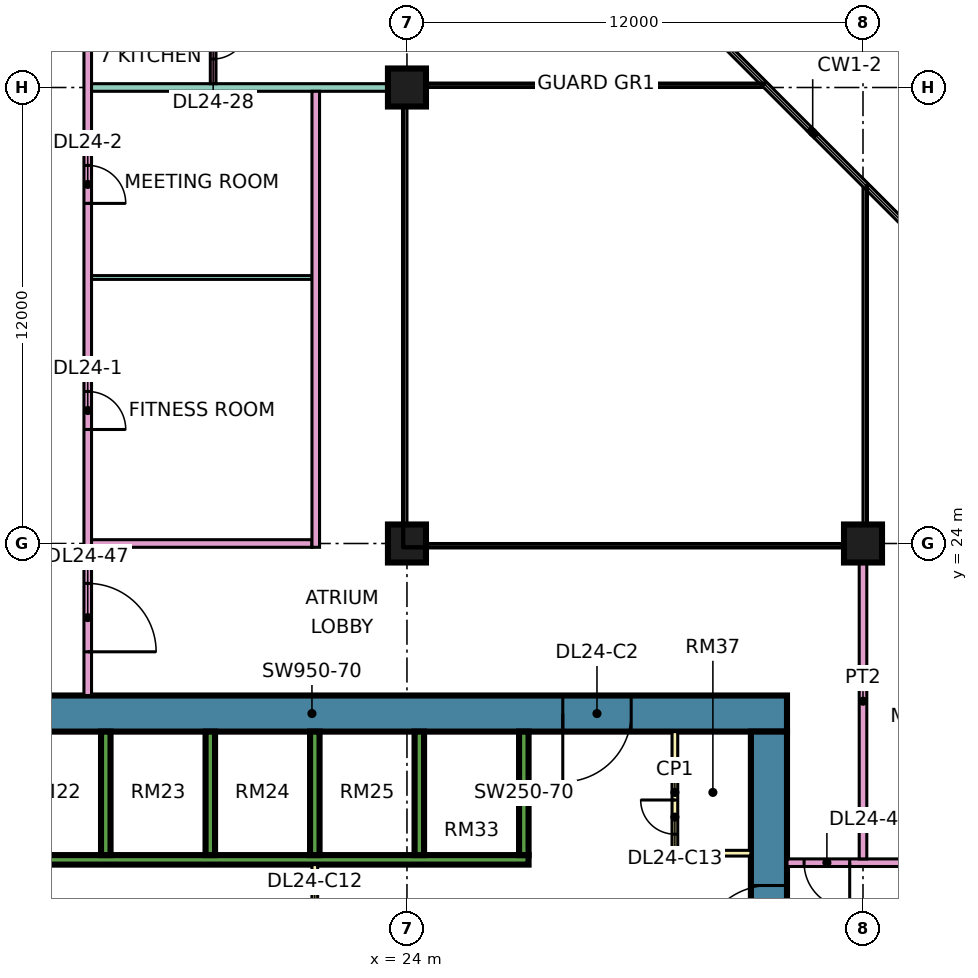
"""IFC4 building model, lengths in metres.
Left out: names, types, materials, properties, quantities, classifications, styles, units other than length and angle.
Written with IfcOpenShell. Run it as: python <this file> out.ifc"""

import sys

from ifc_helpers import new_model, si_unit, direction, frame, frame_2d, origin, origin_2d, place, context, subcontext, project, spatial, rectangle, extrude, element, fill, save


model = new_model("IFC4")
c1 = context("Model", 3, precision=1e-05, world=origin(), true_north=direction((0.0, 1.0)))
c2 = subcontext(c1, "Body", "Model", "MODEL_VIEW")
j1 = project(units=[si_unit("LENGTHUNIT", "METRE"), si_unit("PLANEANGLEUNIT", "RADIAN")], contexts=[c1])
p1 = place(None, origin())
s1 = spatial("IfcSite", under=j1, at=p1, CompositionType="ELEMENT")
p2 = place(p1, origin())
s2 = spatial("IfcBuilding", under=s1, at=p2, CompositionType="ELEMENT")
p3 = place(p2, frame((0.0, 0.0, 106.9)))
s3 = spatial("IfcBuildingStorey", under=s2, at=p3, CompositionType="ELEMENT", Elevation=106.9)
for number, where, z_axis, x_axis in (
    (1, (24.0, 24.0, 0.0), (0.0, 0.0, 1.0), (1.0, 0.0, 0.0)),
    (2, (24.0, 36.0, 0.0), (0.0, 0.0, 1.0), (1.0, 0.0, 0.0)),
    (3, (36.0, 24.0, 0.0), (0.0, 0.0, 1.0), (1.0, 0.0, 0.0)),
):
    element("IfcColumn", number, at=place(p3, frame(where, z_axis=z_axis, x_axis=x_axis)), inside=s3, PredefinedType="COLUMN", context=c2, shape_type="SweptSolid", body=[
        extrude(rectangle(XDim=1.0, YDim=1.0, at=origin_2d()), origin(), (0.0, 0.0, 1.0), 3.75),
    ])
p4 = place(p3, frame((9.0, 19.525, 0.0), z_axis=(0.0, 0.0, 1.0), x_axis=(1.0, 0.0, 0.0)))
e4 = element("IfcWall", 4, at=p4, inside=s3, PredefinedType="SHEAR", context=c2, shape_type="SweptSolid", body=[
    extrude(rectangle(XDim=25.0, YDim=0.95, at=frame_2d((12.5, 0.0))), origin(), (0.0, 0.0, 1.0), 3.75),
])
p5 = place(p4, frame((19.1, 0.0, 0.0)))
e5 = element("IfcOpeningElement", 5, at=p5, cuts=e4, PredefinedType="OPENING", context=c2, shape_type="SweptSolid", body=[
    extrude(rectangle(XDim=1.8, YDim=2.4, at=frame_2d((0.9, 1.2))), frame((0.0, 0.485, 0.0), z_axis=(0.0, -1.0, 0.0), x_axis=(1.0, 0.0, 0.0)), (0.0, 0.0, 1.0), 0.97),
])
p6 = place(p3, frame((33.525, 7.95, 0.0), z_axis=(0.0, 0.0, 1.0), x_axis=(0.0, 1.0, 0.0)))
e6 = element("IfcWall", 6, at=p6, inside=s3, PredefinedType="SHEAR", context=c2, shape_type="SweptSolid", body=[
    extrude(rectangle(XDim=11.1, YDim=0.95, at=frame_2d((5.55, 0.0))), origin(), (0.0, 0.0, 1.0), 3.75),
])
p7 = place(p6, frame((5.25, 0.0, 0.0)))
e7 = element("IfcOpeningElement", 7, at=p7, cuts=e6, PredefinedType="OPENING", context=c2, shape_type="SweptSolid", body=[
    extrude(rectangle(XDim=1.8, YDim=2.4, at=frame_2d((0.9, 1.2))), frame((0.0, 0.485, 0.0), z_axis=(0.0, -1.0, 0.0), x_axis=(1.0, 0.0, 0.0)), (0.0, 0.0, 1.0), 0.97),
])
p8 = place(p3, frame((13.45, 15.675, 0.0), z_axis=(0.0, 0.0, 1.0), x_axis=(1.0, 0.0, 0.0)))
e8 = element("IfcWall", 8, at=p8, inside=s3, PredefinedType="SHEAR", context=c2, shape_type="SweptSolid", body=[
    extrude(rectangle(XDim=13.75, YDim=0.25, at=frame_2d((6.875, 0.0))), origin(), (0.0, 0.0, 1.0), 3.75),
])
for number, where, z_axis, x_axis in (
    (9, (16.075, 15.8, 0.0), (0.0, 0.0, 1.0), (0.0, 1.0, 0.0)),
    (10, (18.825, 15.8, 0.0), (0.0, 0.0, 1.0), (0.0, 1.0, 0.0)),
    (11, (21.575, 15.8, 0.0), (0.0, 0.0, 1.0), (0.0, 1.0, 0.0)),
    (12, (24.325, 15.8, 0.0), (0.0, 0.0, 1.0), (0.0, 1.0, 0.0)),
    (13, (27.075, 15.8, 0.0), (0.0, 0.0, 1.0), (0.0, 1.0, 0.0)),
):
    element("IfcWall", number, at=place(p3, frame(where, z_axis=z_axis, x_axis=x_axis)), inside=s3, PredefinedType="SHEAR", context=c2, shape_type="SweptSolid", body=[
        extrude(rectangle(XDim=3.25, YDim=0.25, at=frame_2d((1.625, 0.0))), origin(), (0.0, 0.0, 1.0), 3.75),
    ])
p9 = place(p3, frame((21.575, 11.45, 0.0), z_axis=(0.0, 0.0, 1.0), x_axis=(0.0, 1.0, 0.0)))
e14 = element("IfcWall", 14, at=p9, inside=s3, PredefinedType="PARTITIONING", context=c2, shape_type="SweptSolid", body=[
    extrude(rectangle(XDim=4.1, YDim=0.15, at=frame_2d((2.05, 0.0))), origin(), (0.0, 0.0, 1.0), 3.35),
])
p10 = place(p9, frame((1.15, 0.0, 0.0)))
e15 = element("IfcOpeningElement", 15, at=p10, cuts=e14, PredefinedType="OPENING", context=c2, shape_type="SweptSolid", body=[
    extrude(rectangle(XDim=1.8, YDim=2.4, at=frame_2d((0.9, 1.2))), frame((0.0, 0.085, 0.0), z_axis=(0.0, -1.0, 0.0), x_axis=(1.0, 0.0, 0.0)), (0.0, 0.0, 1.0), 0.17),
])
p11 = place(p3, frame((31.05, 15.85, 0.0), z_axis=(0.0, 0.0, 1.0), x_axis=(0.0, 1.0, 0.0)))
e16 = element("IfcWall", 16, at=p11, inside=s3, PredefinedType="PARTITIONING", context=c2, shape_type="SweptSolid", body=[
    extrude(rectangle(XDim=3.2, YDim=0.15, at=frame_2d((1.6, 0.0))), origin(), (0.0, 0.0, 1.0), 3.35),
])
p12 = place(p11, frame((0.5, 0.0, 0.0)))
e17 = element("IfcOpeningElement", 17, at=p12, cuts=e16, PredefinedType="OPENING", context=c2, shape_type="SweptSolid", body=[
    extrude(rectangle(XDim=0.9, YDim=2.1, at=frame_2d((0.45, 1.05))), frame((0.0, 0.085, 0.0), z_axis=(0.0, -1.0, 0.0), x_axis=(1.0, 0.0, 0.0)), (0.0, 0.0, 1.0), 0.17),
])
p13 = place(p3, frame((31.05, 15.85, 0.0), z_axis=(0.0, 0.0, 1.0), x_axis=(1.0, 0.0, 0.0)))
e18 = element("IfcWall", 18, at=p13, inside=s3, PredefinedType="PARTITIONING", context=c2, shape_type="SweptSolid", body=[
    extrude(rectangle(XDim=2.0, YDim=0.15, at=frame_2d((1.0, 0.0))), origin(), (0.0, 0.0, 1.0), 3.35),
])
p14 = place(p3, frame((15.6, 20.0, 0.0), z_axis=(0.0, 0.0, 1.0), x_axis=(0.0, 1.0, 0.0)))
e19 = element("IfcWall", 19, at=p14, inside=s3, PredefinedType="PARTITIONING", context=c2, shape_type="SweptSolid", body=[
    extrude(rectangle(XDim=27.775, YDim=0.2, at=frame_2d((13.887, 0.0))), origin(), (0.0, 0.0, 1.0), 3.35),
])
p15 = place(p14, frame((7.0, 0.0, 0.0)))
e20 = element("IfcOpeningElement", 20, at=p15, cuts=e19, PredefinedType="OPENING", context=c2, shape_type="SweptSolid", body=[
    extrude(rectangle(XDim=1.0, YDim=2.1, at=frame_2d((0.5, 1.05))), frame((0.0, 0.11, 0.0), z_axis=(0.0, -1.0, 0.0), x_axis=(1.0, 0.0, 0.0)), (0.0, 0.0, 1.0), 0.22),
])
p16 = place(p14, frame((12.95, 0.0, 0.0)))
e21 = element("IfcOpeningElement", 21, at=p16, cuts=e19, PredefinedType="OPENING", context=c2, shape_type="SweptSolid", body=[
    extrude(rectangle(XDim=1.0, YDim=2.1, at=frame_2d((0.5, 1.05))), frame((0.0, 0.11, 0.0), z_axis=(0.0, -1.0, 0.0), x_axis=(1.0, 0.0, 0.0)), (0.0, 0.0, 1.0), 0.22),
])
p17 = place(p14, frame((23.2, 0.0, 0.0)))
e22 = element("IfcOpeningElement", 22, at=p17, cuts=e19, PredefinedType="OPENING", context=c2, shape_type="SweptSolid", body=[
    extrude(rectangle(XDim=1.0, YDim=2.1, at=frame_2d((0.5, 1.05))), frame((0.0, 0.11, 0.0), z_axis=(0.0, -1.0, 0.0), x_axis=(1.0, 0.0, 0.0)), (0.0, 0.0, 1.0), 0.22),
])
p18 = place(p14, frame((1.15, 0.0, 0.0)))
e23 = element("IfcOpeningElement", 23, at=p18, cuts=e19, PredefinedType="OPENING", context=c2, shape_type="SweptSolid", body=[
    extrude(rectangle(XDim=1.8, YDim=2.1, at=frame_2d((0.9, 1.05))), frame((0.0, 0.11, 0.0), z_axis=(0.0, -1.0, 0.0), x_axis=(1.0, 0.0, 0.0)), (0.0, 0.0, 1.0), 0.22),
])
p19 = place(p14, frame((25.9, 0.0, 0.0)))
e24 = element("IfcOpeningElement", 24, at=p19, cuts=e19, PredefinedType="OPENING", context=c2, shape_type="SweptSolid", body=[
    extrude(rectangle(XDim=1.0, YDim=2.1, at=frame_2d((0.5, 1.05))), frame((0.0, 0.11, 0.0), z_axis=(0.0, -1.0, 0.0), x_axis=(1.0, 0.0, 0.0)), (0.0, 0.0, 1.0), 0.22),
])
p20 = place(p3, frame((15.7, 24.0, 0.0), z_axis=(0.0, 0.0, 1.0), x_axis=(1.0, 0.0, 0.0)))
e25 = element("IfcWall", 25, at=p20, inside=s3, PredefinedType="PARTITIONING", context=c2, shape_type="SweptSolid", body=[
    extrude(rectangle(XDim=5.8, YDim=0.2, at=frame_2d((2.9, 0.0))), origin(), (0.0, 0.0, 1.0), 3.35),
])
p21 = place(p3, frame((15.7, 31.0, 0.0), z_axis=(0.0, 0.0, 1.0), x_axis=(1.0, 0.0, 0.0)))
e26 = element("IfcWall", 26, at=p21, inside=s3, PredefinedType="PARTITIONING", context=c2, shape_type="SweptSolid", body=[
    extrude(rectangle(XDim=5.8, YDim=0.1, at=frame_2d((2.9, 0.0))), origin(), (0.0, 0.0, 1.0), 3.35),
])
p22 = place(p3, frame((15.7, 36.0, 0.0), z_axis=(0.0, 0.0, 1.0), x_axis=(1.0, 0.0, 0.0)))
e27 = element("IfcWall", 27, at=p22, inside=s3, PredefinedType="PARTITIONING", context=c2, shape_type="SweptSolid", body=[
    extrude(rectangle(XDim=8.3, YDim=0.2, at=frame_2d((4.15, 0.0))), origin(), (0.0, 0.0, 1.0), 3.35),
])
p23 = place(p3, frame((18.9, 36.1, 0.0), z_axis=(0.0, 0.0, 1.0), x_axis=(0.0, 1.0, 0.0)))
e28 = element("IfcWall", 28, at=p23, inside=s3, PredefinedType="PARTITIONING", context=c2, shape_type="SweptSolid", body=[
    extrude(rectangle(XDim=6.275, YDim=0.15, at=frame_2d((3.137, 0.0))), origin(), (0.0, 0.0, 1.0), 3.35),
])
p24 = place(p23, frame((0.65, 0.0, 0.0)))
e29 = element("IfcOpeningElement", 29, at=p24, cuts=e28, PredefinedType="OPENING", context=c2, shape_type="SweptSolid", body=[
    extrude(rectangle(XDim=0.9, YDim=2.1, at=frame_2d((0.45, 1.05))), frame((0.0, 0.085, 0.0), z_axis=(0.0, -1.0, 0.0), x_axis=(1.0, 0.0, 0.0)), (0.0, 0.0, 1.0), 0.17),
])
p25 = place(p3, frame((21.6, 23.9, 0.0), z_axis=(0.0, 0.0, 1.0), x_axis=(0.0, 1.0, 0.0)))
e30 = element("IfcWall", 30, at=p25, inside=s3, PredefinedType="PARTITIONING", context=c2, shape_type="SweptSolid", body=[
    extrude(rectangle(XDim=12.0, YDim=0.2, at=frame_2d((6.0, 0.0))), origin(), (0.0, 0.0, 1.0), 3.35),
])
p26 = place(p3, frame((34.0, 15.6, 0.0), z_axis=(0.0, 0.0, 1.0), x_axis=(1.0, 0.0, 0.0)))
e31 = element("IfcWall", 31, at=p26, inside=s3, PredefinedType="PARTITIONING", context=c2, shape_type="SweptSolid", body=[
    extrude(rectangle(XDim=10.35, YDim=0.2, at=frame_2d((5.175, 0.0))), origin(), (0.0, 0.0, 1.0), 3.35),
])
p27 = place(p26, frame((5.6, 0.0, 0.0)))
e32 = element("IfcOpeningElement", 32, at=p27, cuts=e31, PredefinedType="OPENING", context=c2, shape_type="SweptSolid", body=[
    extrude(rectangle(XDim=1.0, YDim=2.1, at=frame_2d((0.5, 1.05))), frame((0.0, 0.11, 0.0), z_axis=(0.0, -1.0, 0.0), x_axis=(1.0, 0.0, 0.0)), (0.0, 0.0, 1.0), 0.22),
])
p28 = place(p26, frame((0.45, 0.0, 0.0)))
e33 = element("IfcOpeningElement", 33, at=p28, cuts=e31, PredefinedType="OPENING", context=c2, shape_type="SweptSolid", body=[
    extrude(rectangle(XDim=1.2, YDim=2.1, at=frame_2d((0.6, 1.05))), frame((0.0, 0.11, 0.0), z_axis=(0.0, -1.0, 0.0), x_axis=(1.0, 0.0, 0.0)), (0.0, 0.0, 1.0), 0.22),
])
p29 = place(p3, frame((36.0, 15.7, 0.0), z_axis=(0.0, 0.0, 1.0), x_axis=(0.0, 1.0, 0.0)))
e34 = element("IfcWall", 34, at=p29, inside=s3, PredefinedType="PARTITIONING", context=c2, shape_type="SweptSolid", body=[
    extrude(rectangle(XDim=8.3, YDim=0.2, at=frame_2d((4.15, 0.0))), origin(), (0.0, 0.0, 1.0), 3.35),
])
p30 = place(p7, origin())
e35 = element("IfcDoor", 35, at=p30, inside=s3, OperationType="DOUBLE_DOOR_SINGLE_SWING", PredefinedType="DOOR", context=c2, shape_type="SweptSolid", body=[
    extrude(rectangle(XDim=1.8, YDim=2.4, at=frame_2d((0.9, 1.2))), frame((0.0, 0.025, 0.0), z_axis=(0.0, -1.0, 0.0), x_axis=(1.0, 0.0, 0.0)), (0.0, 0.0, 1.0), 0.05),
])
fill(e7, e35)
p31 = place(p5, frame((1.8, 0.0, 0.0), z_axis=(0.0, 0.0, 1.0), x_axis=(-1.0, 0.0, 0.0)))
e36 = element("IfcDoor", 36, at=p31, inside=s3, OperationType="DOUBLE_DOOR_SINGLE_SWING", PredefinedType="DOOR", context=c2, shape_type="SweptSolid", body=[
    extrude(rectangle(XDim=1.8, YDim=2.4, at=frame_2d((0.9, 1.2))), frame((0.0, 0.025, 0.0), z_axis=(0.0, -1.0, 0.0), x_axis=(1.0, 0.0, 0.0)), (0.0, 0.0, 1.0), 0.05),
])
fill(e5, e36)
p32 = place(p12, frame((0.9, 0.0, 0.0), z_axis=(0.0, 0.0, 1.0), x_axis=(-1.0, 0.0, 0.0)))
e37 = element("IfcDoor", 37, at=p32, inside=s3, OperationType="SINGLE_SWING_RIGHT", PredefinedType="DOOR", context=c2, shape_type="SweptSolid", body=[
    extrude(rectangle(XDim=0.9, YDim=2.1, at=frame_2d((0.45, 1.05))), frame((0.0, 0.025, 0.0), z_axis=(0.0, -1.0, 0.0), x_axis=(1.0, 0.0, 0.0)), (0.0, 0.0, 1.0), 0.05),
])
fill(e17, e37)
p33 = place(p15, frame((1.0, 0.0, 0.0), z_axis=(0.0, 0.0, 1.0), x_axis=(-1.0, 0.0, 0.0)))
e38 = element("IfcDoor", 38, at=p33, inside=s3, OperationType="SINGLE_SWING_LEFT", PredefinedType="DOOR", context=c2, shape_type="SweptSolid", body=[
    extrude(rectangle(XDim=1.0, YDim=2.1, at=frame_2d((0.5, 1.05))), frame((0.0, 0.025, 0.0), z_axis=(0.0, -1.0, 0.0), x_axis=(1.0, 0.0, 0.0)), (0.0, 0.0, 1.0), 0.05),
])
fill(e20, e38)
p34 = place(p16, frame((1.0, 0.0, 0.0), z_axis=(0.0, 0.0, 1.0), x_axis=(-1.0, 0.0, 0.0)))
e39 = element("IfcDoor", 39, at=p34, inside=s3, OperationType="SINGLE_SWING_LEFT", PredefinedType="DOOR", context=c2, shape_type="SweptSolid", body=[
    extrude(rectangle(XDim=1.0, YDim=2.1, at=frame_2d((0.5, 1.05))), frame((0.0, 0.025, 0.0), z_axis=(0.0, -1.0, 0.0), x_axis=(1.0, 0.0, 0.0)), (0.0, 0.0, 1.0), 0.05),
])
fill(e21, e39)
p35 = place(p24, origin())
e40 = element("IfcDoor", 40, at=p35, inside=s3, OperationType="SINGLE_SWING_RIGHT", PredefinedType="DOOR", context=c2, shape_type="SweptSolid", body=[
    extrude(rectangle(XDim=0.9, YDim=2.1, at=frame_2d((0.45, 1.05))), frame((0.0, 0.025, 0.0), z_axis=(0.0, -1.0, 0.0), x_axis=(1.0, 0.0, 0.0)), (0.0, 0.0, 1.0), 0.05),
])
fill(e29, e40)
p36 = place(p28, origin())
e41 = element("IfcDoor", 41, at=p36, inside=s3, OperationType="SINGLE_SWING_RIGHT", PredefinedType="DOOR", context=c2, shape_type="SweptSolid", body=[
    extrude(rectangle(XDim=1.2, YDim=2.1, at=frame_2d((0.6, 1.05))), frame((0.0, 0.025, 0.0), z_axis=(0.0, -1.0, 0.0), x_axis=(1.0, 0.0, 0.0)), (0.0, 0.0, 1.0), 0.05),
])
fill(e33, e41)
p37 = place(p18, frame((1.8, 0.0, 0.0), z_axis=(0.0, 0.0, 1.0), x_axis=(-1.0, 0.0, 0.0)))
e42 = element("IfcDoor", 42, at=p37, inside=s3, OperationType="DOUBLE_DOOR_SINGLE_SWING", PredefinedType="DOOR", context=c2, shape_type="SweptSolid", body=[
    extrude(rectangle(XDim=1.8, YDim=2.1, at=frame_2d((0.9, 1.05))), frame((0.0, 0.025, 0.0), z_axis=(0.0, -1.0, 0.0), x_axis=(1.0, 0.0, 0.0)), (0.0, 0.0, 1.0), 0.05),
])
fill(e23, e42)
save(model, sys.argv[1])
